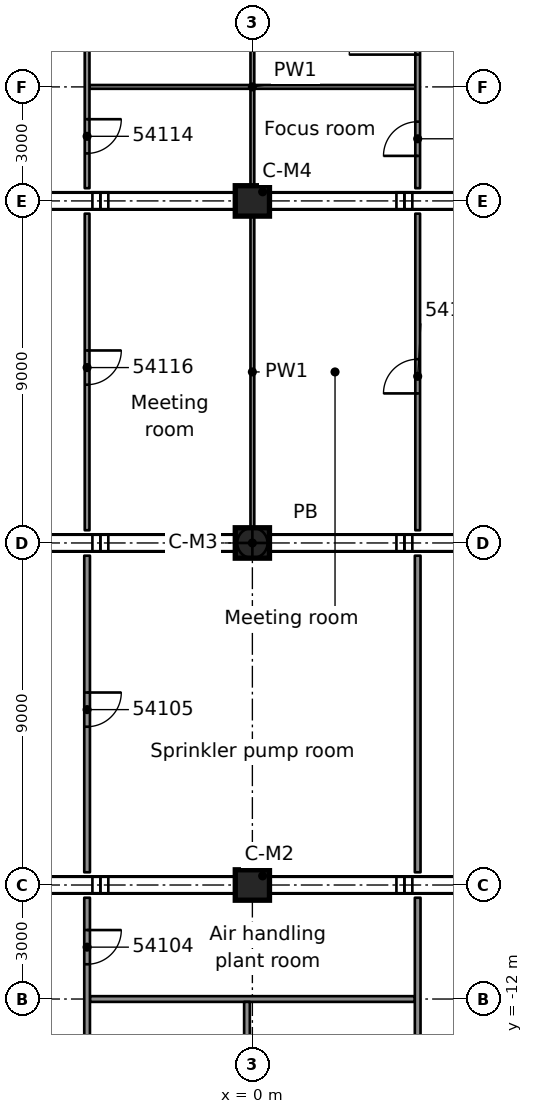
"""IFC4 building model, lengths in metres.
Left out: names, types, materials, properties, quantities, classifications, styles, units other than length and angle.
Written with IfcOpenShell. Run it as: python <this file> out.ifc"""

import sys

from ifc_helpers import new_model, si_unit, direction, frame, frame_2d, origin, origin_2d, place, context, subcontext, project, spatial, rectangle, extrude, element, fill, save


model = new_model("IFC4")
c1 = context("Model", 3, precision=1e-05, world=origin(), true_north=direction((0.0, 1.0)))
c2 = subcontext(c1, "Body", "Model", "MODEL_VIEW")
j1 = project(units=[si_unit("LENGTHUNIT", "METRE"), si_unit("PLANEANGLEUNIT", "RADIAN")], contexts=[c1])
p1 = place(None, origin())
s1 = spatial("IfcSite", under=j1, at=p1, CompositionType="ELEMENT")
p2 = place(p1, origin())
s2 = spatial("IfcBuilding", under=s1, at=p2, CompositionType="ELEMENT")
p3 = place(p2, frame((0.0, 0.0, 271.0)))
s3 = spatial("IfcBuildingStorey", under=s2, at=p3, CompositionType="ELEMENT", Elevation=271.0)
for number, where, z_axis, x_axis in (
    (1, (0.0, -9.0, 0.0), (0.0, 0.0, 1.0), (1.0, 0.0, 0.0)),
    (2, (0.0, 0.0, 0.0), (0.0, 0.0, 1.0), (1.0, 0.0, 0.0)),
    (3, (0.0, 9.0, 0.0), (0.0, 0.0, 1.0), (1.0, 0.0, 0.0)),
):
    element("IfcColumn", number, at=place(p3, frame(where, z_axis=z_axis, x_axis=x_axis)), inside=s3, PredefinedType="COLUMN", context=c2, shape_type="SweptSolid", body=[
        extrude(rectangle(XDim=0.9, YDim=0.8, at=origin_2d()), origin(), (0.0, 0.0, 1.0), 4.4),
    ])
p4 = place(p3, frame((-4.274, -12.0, 0.0), z_axis=(0.0, 0.0, 1.0), x_axis=(1.0, 0.0, 0.0)))
e4 = element("IfcWall", 4, at=p4, inside=s3, PredefinedType="PARTITIONING", context=c2, shape_type="SweptSolid", body=[
    extrude(rectangle(XDim=8.549, YDim=0.15, at=frame_2d((4.274, 0.0))), origin(), (0.0, 0.0, 1.0), 3.98),
])
p5 = place(p3, frame((-4.287, 12.0, 0.0), z_axis=(0.0, 0.0, 1.0), x_axis=(1.0, 0.0, 0.0)))
e5 = element("IfcWall", 5, at=p5, inside=s3, PredefinedType="PARTITIONING", context=c2, shape_type="SweptSolid", body=[
    extrude(rectangle(XDim=8.574, YDim=0.1, at=frame_2d((4.287, 0.0))), origin(), (0.0, 0.0, 1.0), 3.98),
])
p6 = place(p3, frame((4.35, -15.6, 0.0), z_axis=(0.0, 0.0, 1.0), x_axis=(0.0, 1.0, 0.0)))
e6 = element("IfcWall", 6, at=p6, inside=s3, PredefinedType="PARTITIONING", context=c2, shape_type="SweptSolid", body=[
    extrude(rectangle(XDim=6.265, YDim=0.15, at=frame_2d((3.133, 0.0))), origin(), (0.0, 0.0, 1.0), 3.98),
])
p7 = place(p3, frame((4.35, -8.665, 0.0), z_axis=(0.0, 0.0, 1.0), x_axis=(0.0, 1.0, 0.0)))
e7 = element("IfcWall", 7, at=p7, inside=s3, PredefinedType="PARTITIONING", context=c2, shape_type="SweptSolid", body=[
    extrude(rectangle(XDim=8.33, YDim=0.15, at=frame_2d((4.165, 0.0))), origin(), (0.0, 0.0, 1.0), 3.98),
])
p8 = place(p3, frame((4.35, 0.335, 0.0), z_axis=(0.0, 0.0, 1.0), x_axis=(0.0, 1.0, 0.0)))
e8 = element("IfcWall", 8, at=p8, inside=s3, PredefinedType="PARTITIONING", context=c2, shape_type="SweptSolid", body=[
    extrude(rectangle(XDim=8.33, YDim=0.125, at=frame_2d((4.165, 0.0))), origin(), (0.0, 0.0, 1.0), 3.98),
])
p9 = place(p8, frame((3.6, 0.0, 0.0)))
e9 = element("IfcOpeningElement", 9, at=p9, cuts=e8, PredefinedType="OPENING", context=c2, shape_type="SweptSolid", body=[
    extrude(rectangle(XDim=0.9, YDim=2.1, at=frame_2d((0.45, 1.05))), frame((0.0, 0.073, 0.0), z_axis=(0.0, -1.0, 0.0), x_axis=(1.0, 0.0, 0.0)), (0.0, 0.0, 1.0), 0.145),
])
p10 = place(p3, frame((4.35, 9.335, 0.0), z_axis=(0.0, 0.0, 1.0), x_axis=(0.0, 1.0, 0.0)))
e10 = element("IfcWall", 10, at=p10, inside=s3, PredefinedType="PARTITIONING", context=c2, shape_type="SweptSolid", body=[
    extrude(rectangle(XDim=6.266, YDim=0.125, at=frame_2d((3.133, 0.0))), origin(), (0.0, 0.0, 1.0), 3.98),
])
p11 = place(p10, frame((3.515, 0.0, 0.0)))
e11 = element("IfcOpeningElement", 11, at=p11, cuts=e10, PredefinedType="OPENING", context=c2, shape_type="SweptSolid", body=[
    extrude(rectangle(XDim=1.8, YDim=2.1, at=frame_2d((0.9, 1.05))), frame((0.0, 0.073, 0.0), z_axis=(0.0, -1.0, 0.0), x_axis=(1.0, 0.0, 0.0)), (0.0, 0.0, 1.0), 0.145),
])
p12 = place(p10, frame((0.85, 0.0, 0.0)))
e12 = element("IfcOpeningElement", 12, at=p12, cuts=e10, PredefinedType="OPENING", context=c2, shape_type="SweptSolid", body=[
    extrude(rectangle(XDim=0.9, YDim=2.1, at=frame_2d((0.45, 1.05))), frame((0.0, 0.073, 0.0), z_axis=(0.0, -1.0, 0.0), x_axis=(1.0, 0.0, 0.0)), (0.0, 0.0, 1.0), 0.145),
])
p13 = place(p3, frame((0.0, 0.335, 0.0), z_axis=(0.0, 0.0, 1.0), x_axis=(0.0, 1.0, 0.0)))
e13 = element("IfcWall", 13, at=p13, inside=s3, PredefinedType="PARTITIONING", context=c2, shape_type="SweptSolid", body=[
    extrude(rectangle(XDim=8.33, YDim=0.1, at=frame_2d((4.165, 0.0))), origin(), (0.0, 0.0, 1.0), 3.98),
])
p14 = place(p3, frame((0.0, 9.335, 0.0), z_axis=(0.0, 0.0, 1.0), x_axis=(0.0, 1.0, 0.0)))
e14 = element("IfcWall", 14, at=p14, inside=s3, PredefinedType="PARTITIONING", context=c2, shape_type="SweptSolid", body=[
    extrude(rectangle(XDim=22.286, YDim=0.1, at=frame_2d((11.143, 0.0))), origin(), (0.0, 0.0, 1.0), 3.478),
])
p15 = place(p3, frame((-0.142, -30.349, 0.0), z_axis=(0.0, 0.0, 1.0), x_axis=(0.0, 1.0, 0.0)))
e15 = element("IfcWall", 15, at=p15, inside=s3, PredefinedType="PARTITIONING", context=c2, shape_type="SweptSolid", body=[
    extrude(rectangle(XDim=18.274, YDim=0.15, at=frame_2d((9.137, 0.0))), origin(), (0.0, 0.0, 1.0), 3.98),
])
p16 = place(p3, frame((-4.349, -9.335, 0.0), z_axis=(0.0, 0.0, 1.0), x_axis=(0.0, -1.0, 0.0)))
e16 = element("IfcWall", 16, at=p16, inside=s3, PredefinedType="PARTITIONING", context=c2, shape_type="SweptSolid", body=[
    extrude(rectangle(XDim=6.265, YDim=0.15, at=frame_2d((3.133, 0.0))), origin(), (0.0, 0.0, 1.0), 3.98),
])
p17 = place(p16, frame((4.015, 0.0, 0.0)))
e17 = element("IfcOpeningElement", 17, at=p17, cuts=e16, PredefinedType="OPENING", context=c2, shape_type="SweptSolid", body=[
    extrude(rectangle(XDim=0.9, YDim=2.1, at=frame_2d((0.45, 1.05))), frame((0.0, 0.085, 0.0), z_axis=(0.0, -1.0, 0.0), x_axis=(1.0, 0.0, 0.0)), (0.0, 0.0, 1.0), 0.17),
])
p18 = place(p16, frame((0.85, 0.0, 0.0)))
e18 = element("IfcOpeningElement", 18, at=p18, cuts=e16, PredefinedType="OPENING", context=c2, shape_type="SweptSolid", body=[
    extrude(rectangle(XDim=0.9, YDim=2.1, at=frame_2d((0.45, 1.05))), frame((0.0, 0.085, 0.0), z_axis=(0.0, -1.0, 0.0), x_axis=(1.0, 0.0, 0.0)), (0.0, 0.0, 1.0), 0.17),
])
p19 = place(p3, frame((-4.349, -0.335, 0.0), z_axis=(0.0, 0.0, 1.0), x_axis=(0.0, -1.0, 0.0)))
e19 = element("IfcWall", 19, at=p19, inside=s3, PredefinedType="PARTITIONING", context=c2, shape_type="SweptSolid", body=[
    extrude(rectangle(XDim=8.33, YDim=0.15, at=frame_2d((4.165, 0.0))), origin(), (0.0, 0.0, 1.0), 3.98),
])
p20 = place(p19, frame((3.6, 0.0, 0.0)))
e20 = element("IfcOpeningElement", 20, at=p20, cuts=e19, PredefinedType="OPENING", context=c2, shape_type="SweptSolid", body=[
    extrude(rectangle(XDim=0.9, YDim=2.1, at=frame_2d((0.45, 1.05))), frame((0.0, 0.085, 0.0), z_axis=(0.0, -1.0, 0.0), x_axis=(1.0, 0.0, 0.0)), (0.0, 0.0, 1.0), 0.17),
])
p21 = place(p3, frame((-4.349, 8.665, 0.0), z_axis=(0.0, 0.0, 1.0), x_axis=(0.0, -1.0, 0.0)))
e21 = element("IfcWall", 21, at=p21, inside=s3, PredefinedType="PARTITIONING", context=c2, shape_type="SweptSolid", body=[
    extrude(rectangle(XDim=8.33, YDim=0.125, at=frame_2d((4.165, 0.0))), origin(), (0.0, 0.0, 1.0), 3.98),
])
p22 = place(p21, frame((3.6, 0.0, 0.0)))
e22 = element("IfcOpeningElement", 22, at=p22, cuts=e21, PredefinedType="OPENING", context=c2, shape_type="SweptSolid", body=[
    extrude(rectangle(XDim=0.9, YDim=2.1, at=frame_2d((0.45, 1.05))), frame((0.0, 0.073, 0.0), z_axis=(0.0, -1.0, 0.0), x_axis=(1.0, 0.0, 0.0)), (0.0, 0.0, 1.0), 0.145),
])
p23 = place(p3, frame((-4.349, 15.6, 0.0), z_axis=(0.0, 0.0, 1.0), x_axis=(0.0, -1.0, 0.0)))
e23 = element("IfcWall", 23, at=p23, inside=s3, PredefinedType="PARTITIONING", context=c2, shape_type="SweptSolid", body=[
    extrude(rectangle(XDim=6.265, YDim=0.125, at=frame_2d((3.133, 0.0))), origin(), (0.0, 0.0, 1.0), 3.98),
])
p24 = place(p23, frame((4.45, 0.0, 0.0)))
e24 = element("IfcOpeningElement", 24, at=p24, cuts=e23, PredefinedType="OPENING", context=c2, shape_type="SweptSolid", body=[
    extrude(rectangle(XDim=0.9, YDim=2.1, at=frame_2d((0.45, 1.05))), frame((0.0, 0.073, 0.0), z_axis=(0.0, -1.0, 0.0), x_axis=(1.0, 0.0, 0.0)), (0.0, 0.0, 1.0), 0.145),
])
p25 = place(p18, origin())
e25 = element("IfcDoor", 25, at=p25, inside=s3, OperationType="SINGLE_SWING_LEFT", PredefinedType="DOOR", context=c2, shape_type="SweptSolid", body=[
    extrude(rectangle(XDim=0.9, YDim=2.1, at=frame_2d((0.45, 1.05))), frame((0.0, 0.025, 0.0), z_axis=(0.0, -1.0, 0.0), x_axis=(1.0, 0.0, 0.0)), (0.0, 0.0, 1.0), 0.05),
])
fill(e18, e25)
p26 = place(p20, origin())
e26 = element("IfcDoor", 26, at=p26, inside=s3, OperationType="SINGLE_SWING_LEFT", PredefinedType="DOOR", context=c2, shape_type="SweptSolid", body=[
    extrude(rectangle(XDim=0.9, YDim=2.1, at=frame_2d((0.45, 1.05))), frame((0.0, 0.025, 0.0), z_axis=(0.0, -1.0, 0.0), x_axis=(1.0, 0.0, 0.0)), (0.0, 0.0, 1.0), 0.05),
])
fill(e20, e26)
p27 = place(p9, origin())
e27 = element("IfcDoor", 27, at=p27, inside=s3, OperationType="SINGLE_SWING_LEFT", PredefinedType="DOOR", context=c2, shape_type="SweptSolid", body=[
    extrude(rectangle(XDim=0.9, YDim=2.1, at=frame_2d((0.45, 1.05))), frame((0.0, 0.025, 0.0), z_axis=(0.0, -1.0, 0.0), x_axis=(1.0, 0.0, 0.0)), (0.0, 0.0, 1.0), 0.05),
])
fill(e9, e27)
p28 = place(p11, origin())
e28 = element("IfcDoor", 28, at=p28, inside=s3, OperationType="DOUBLE_DOOR_SINGLE_SWING", PredefinedType="DOOR", context=c2, shape_type="SweptSolid", body=[
    extrude(rectangle(XDim=1.8, YDim=2.1, at=frame_2d((0.9, 1.05))), frame((0.0, 0.025, 0.0), z_axis=(0.0, -1.0, 0.0), x_axis=(1.0, 0.0, 0.0)), (0.0, 0.0, 1.0), 0.05),
])
fill(e11, e28)
p29 = place(p12, origin())
e29 = element("IfcDoor", 29, at=p29, inside=s3, OperationType="SINGLE_SWING_LEFT", PredefinedType="DOOR", context=c2, shape_type="SweptSolid", body=[
    extrude(rectangle(XDim=0.9, YDim=2.1, at=frame_2d((0.45, 1.05))), frame((0.0, 0.025, 0.0), z_axis=(0.0, -1.0, 0.0), x_axis=(1.0, 0.0, 0.0)), (0.0, 0.0, 1.0), 0.05),
])
fill(e12, e29)
p30 = place(p24, origin())
e30 = element("IfcDoor", 30, at=p30, inside=s3, OperationType="SINGLE_SWING_RIGHT", PredefinedType="DOOR", context=c2, shape_type="SweptSolid", body=[
    extrude(rectangle(XDim=0.9, YDim=2.1, at=frame_2d((0.45, 1.05))), frame((0.0, 0.025, 0.0), z_axis=(0.0, -1.0, 0.0), x_axis=(1.0, 0.0, 0.0)), (0.0, 0.0, 1.0), 0.05),
])
fill(e24, e30)
p31 = place(p22, origin())
e31 = element("IfcDoor", 31, at=p31, inside=s3, OperationType="SINGLE_SWING_LEFT", PredefinedType="DOOR", context=c2, shape_type="SweptSolid", body=[
    extrude(rectangle(XDim=0.9, YDim=2.1, at=frame_2d((0.45, 1.05))), frame((0.0, 0.025, 0.0), z_axis=(0.0, -1.0, 0.0), x_axis=(1.0, 0.0, 0.0)), (0.0, 0.0, 1.0), 0.05),
])
fill(e22, e31)
save(model, sys.argv[1])
